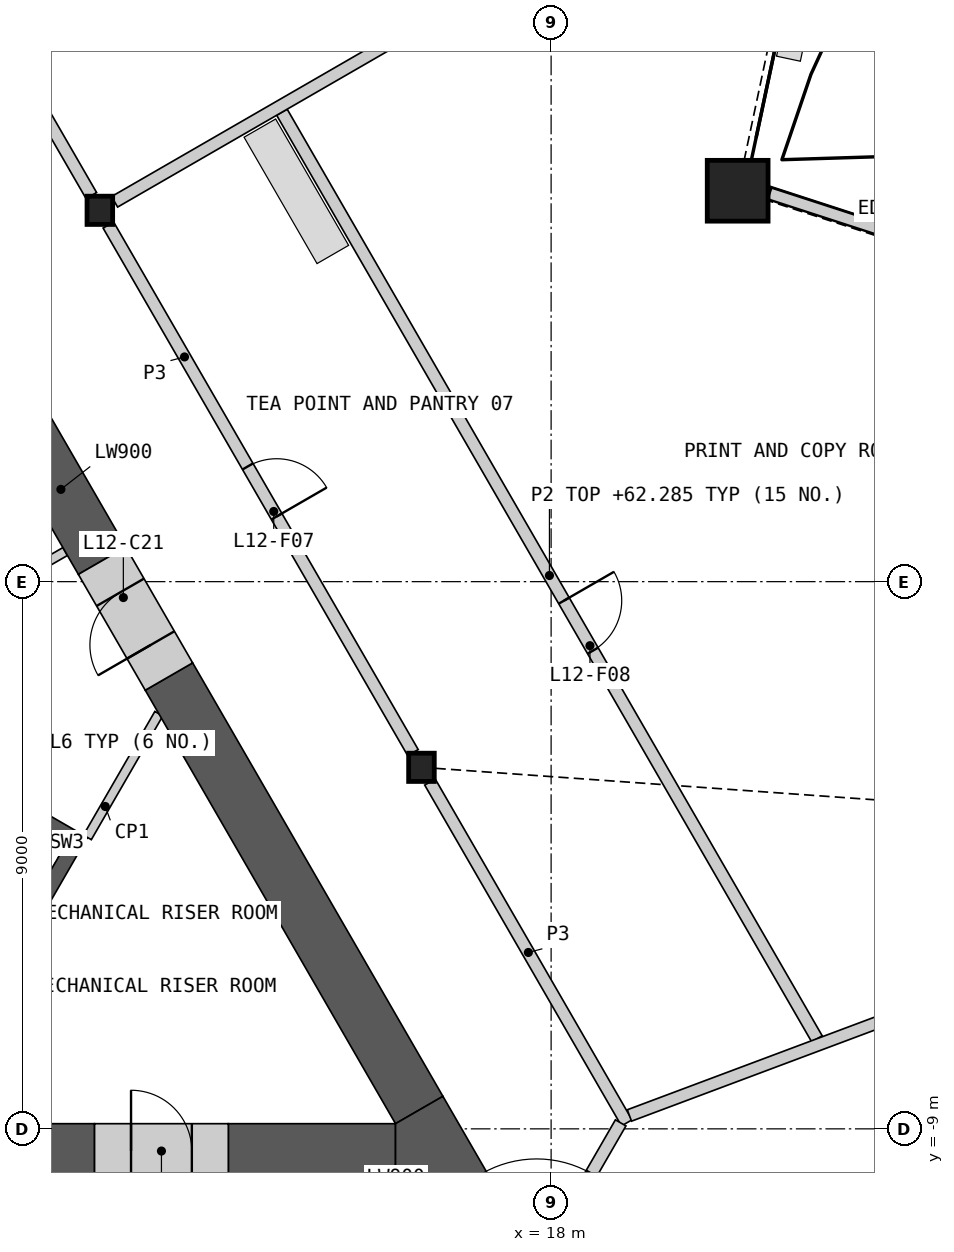
"""IFC4 building model, lengths in metres.
Left out: names, types, materials, properties, quantities, classifications, styles, units other than length and angle.
Written with IfcOpenShell. Run it as: python <this file> out.ifc"""

import sys

from ifc_helpers import new_model, si_unit, direction, frame, frame_2d, origin, origin_2d, place, context, subcontext, project, spatial, polyline, rectangle, hollow_rectangle, i_section, outline, extrude, element, fill, save


model = new_model("IFC4")
c1 = context("Model", 3, precision=1e-05, world=origin(), true_north=direction((0.0, 1.0)))
c2 = subcontext(c1, "Body", "Model", "MODEL_VIEW")
j1 = project(units=[si_unit("LENGTHUNIT", "METRE"), si_unit("PLANEANGLEUNIT", "RADIAN")], contexts=[c1])
p1 = place(None, origin())
s1 = spatial("IfcSite", under=j1, at=p1, CompositionType="ELEMENT")
p2 = place(p1, origin())
s2 = spatial("IfcBuilding", under=s1, at=p2, CompositionType="ELEMENT")
p3 = place(p2, frame((0.0, 0.0, 59.4)))
s3 = spatial("IfcBuildingStorey", under=s2, at=p3, CompositionType="ELEMENT", Elevation=59.4)
p4 = place(p3, frame((21.068, 6.429, 0.0), z_axis=(0.0, 0.0, 1.0), x_axis=(1.0, 0.0, 0.0)))
e1 = element("IfcColumn", 1, at=p4, inside=s3, PredefinedType="COLUMN", context=c2, shape_type="SweptSolid", body=[
    extrude(hollow_rectangle(XDim=1.0, YDim=1.0, WallThickness=0.07, at=origin_2d()), origin(), (0.0, 0.0, 1.0), 4.2),
])
for number, where, z_axis, x_axis in (
    (2, (15.868, -3.054, 0.0), (0.0, 0.0, 1.0), (1.0, 0.0, 0.0)),
    (3, (10.578, 6.107, 0.0), (0.0, 0.0, 1.0), (1.0, 0.0, 0.0)),
):
    element("IfcColumn", number, at=place(p3, frame(where, z_axis=z_axis, x_axis=x_axis)), inside=s3, PredefinedType="COLUMN", context=c2, shape_type="SweptSolid", body=[
        extrude(i_section(OverallWidth=0.421, OverallDepth=0.465, WebThickness=0.045, FlangeThickness=0.072, at=origin_2d()), origin(), (0.0, 0.0, 1.0), 4.2),
    ])
p5 = place(p3, frame((26.899, 4.661, 0.0), z_axis=(0.0, 0.0, 1.0), x_axis=(-0.951054004345, 0.309024725255, 0.0)))
e4 = element("IfcWall", 4, at=p5, inside=s3, PredefinedType="SOLIDWALL", context=c2, shape_type="SweptSolid", body=[
    extrude(rectangle(XDim=5.579, YDim=0.2, at=frame_2d((2.79, 0.0))), origin(), (0.0, 0.0, 1.0), 3.189),
])
p6 = place(p5, frame((1.91, 0.0, 0.0)))
e5 = element("IfcOpeningElement", 5, at=p6, cuts=e4, PredefinedType="OPENING", context=c2, shape_type="SweptSolid", body=[
    extrude(rectangle(XDim=1.6, YDim=2.4, at=frame_2d((0.8, 1.2))), frame((0.0, 0.11, 0.0), z_axis=(0.0, -1.0, 0.0), x_axis=(1.0, 0.0, 0.0)), (0.0, 0.0, 1.0), 0.22),
])
p7 = place(p3, origin())
e6 = element("IfcWall", 6, at=p7, inside=s3, PredefinedType="SHEAR", context=c2, shape_type="SweptSolid", body=[
    extrude(outline(polyline([(8.83, -6.881), (10.374, -4.206), (10.032, -4.298), (8.738, -6.539), (8.83, -6.881)])), origin(), (0.0, 0.0, 1.0), 3.8),
])
p8 = place(p3, origin())
e7 = element("IfcWall", 7, at=p8, inside=s3, PredefinedType="SHEAR", context=c2, shape_type="SweptSolid", body=[
    extrude(outline(polyline([(10.032, -4.298), (10.374, -4.206), (5.307, -1.281), (5.182, -1.498), (10.032, -4.298)])), origin(), (0.0, 0.0, 1.0), 3.8),
])
p9 = place(p3, frame((8.268, -0.509, 0.0), z_axis=(0.0, 0.0, 1.0), x_axis=(0.866035824272, 0.499981950752, 0.0)))
e8 = element("IfcWall", 8, at=p9, inside=s3, PredefinedType="PARTITIONING", context=c2, shape_type="SweptSolid", body=[
    extrude(rectangle(XDim=2.009, YDim=0.15, at=frame_2d((1.004, 0.0))), origin(), (0.0, 0.0, 1.0), 3.8),
])
p10 = place(p3, frame((10.374, -4.206, 0.0), z_axis=(0.0, 0.0, 1.0), x_axis=(0.499995339376, 0.86602809458, 0.0)))
e9 = element("IfcWall", 9, at=p10, inside=s3, PredefinedType="PARTITIONING", context=c2, shape_type="SweptSolid", body=[
    extrude(rectangle(XDim=2.349, YDim=0.15, at=frame_2d((1.175, 0.0))), origin(), (0.0, 0.0, 1.0), 3.8),
])
p11 = place(p3, frame((7.209, -9.365, 0.0), z_axis=(0.0, 0.0, 1.0), x_axis=(1.0, 0.0, 0.0)))
e10 = element("IfcWall", 10, at=p11, inside=s3, PredefinedType="SHEAR", context=c2, shape_type="SweptSolid", body=[
    extrude(rectangle(XDim=3.282, YDim=0.9, at=frame_2d((1.641, 0.0))), origin(), (0.0, 0.0, 1.0), 3.8),
])
p12 = place(p3, frame((12.691, -9.365, 0.0), z_axis=(0.0, 0.0, 1.0), x_axis=(1.0, 0.0, 0.0)))
e11 = element("IfcWall", 11, at=p12, inside=s3, PredefinedType="SHEAR", context=c2, shape_type="SweptSolid", body=[
    extrude(rectangle(XDim=2.75, YDim=0.9, at=frame_2d((1.375, 0.0))), origin(), (0.0, 0.0, 1.0), 3.8),
])
p13 = place(p3, frame((15.831, -8.69, 0.0), z_axis=(0.0, 0.0, 1.0), x_axis=(-0.499995435471, 0.8660280391, 0.0)))
e12 = element("IfcWall", 12, at=p13, inside=s3, PredefinedType="SHEAR", context=c2, shape_type="SweptSolid", body=[
    extrude(rectangle(XDim=8.232, YDim=0.9, at=frame_2d((4.116, 0.0))), origin(), (0.0, 0.0, 1.0), 3.8),
])
p14 = place(p3, frame((10.615, 0.344, 0.0), z_axis=(0.0, 0.0, 1.0), x_axis=(-0.500044870432, 0.865999496279, 0.0)))
e13 = element("IfcWall", 13, at=p14, inside=s3, PredefinedType="SHEAR", context=c2, shape_type="SweptSolid", body=[
    extrude(rectangle(XDim=2.709, YDim=0.9, at=frame_2d((1.354, 0.0))), origin(), (0.0, 0.0, 1.0), 3.8),
])
p15 = place(p3, origin())
e14 = element("IfcWall", 14, at=p15, inside=s3, PredefinedType="SHEAR", context=c2, shape_type="SweptSolid", body=[
    extrude(outline(polyline([(15.441, -9.815), (15.441, -8.915), (16.221, -8.465), (17.0, -9.815), (15.441, -9.815)])), origin(), (0.0, 0.0, 1.0), 3.8),
])
p16 = place(p3, frame((10.491, -9.365, 0.0), z_axis=(0.0, 0.0, 1.0), x_axis=(1.0, 0.0, 0.0)))
e15 = element("IfcWall", 15, at=p16, inside=s3, PredefinedType="SHEAR", context=c2, shape_type="SweptSolid", body=[
    extrude(rectangle(XDim=2.2, YDim=0.9, at=frame_2d((1.1, 0.0))), origin(), (0.0, 0.0, 1.0), 3.8),
])
p17 = place(p16, frame((0.6, 0.0, 0.0)))
e16 = element("IfcOpeningElement", 16, at=p17, cuts=e15, PredefinedType="OPENING", context=c2, shape_type="SweptSolid", body=[
    extrude(rectangle(XDim=1.0, YDim=2.1, at=frame_2d((0.5, 1.05))), frame((0.0, 0.46, 0.0), z_axis=(0.0, -1.0, 0.0), x_axis=(1.0, 0.0, 0.0)), (0.0, 0.0, 1.0), 0.92),
])
p18 = place(p3, frame((11.715, -1.561, 0.0), z_axis=(0.0, 0.0, 1.0), x_axis=(-0.499946605688, 0.86605622881, 0.0)))
e17 = element("IfcWall", 17, at=p18, inside=s3, PredefinedType="SHEAR", context=c2, shape_type="SweptSolid", body=[
    extrude(rectangle(XDim=2.2, YDim=0.9, at=frame_2d((1.1, 0.0))), origin(), (0.0, 0.0, 1.0), 3.8),
])
p19 = place(p18, frame((0.6, 0.0, 0.0)))
e18 = element("IfcOpeningElement", 18, at=p19, cuts=e17, PredefinedType="OPENING", context=c2, shape_type="SweptSolid", body=[
    extrude(rectangle(XDim=1.0, YDim=2.1, at=frame_2d((0.5, 1.05))), frame((0.0, 0.46, 0.0), z_axis=(0.0, -1.0, 0.0), x_axis=(1.0, 0.0, 0.0)), (0.0, 0.0, 1.0), 0.92),
])
p20 = place(p3, frame((5.429, 15.026, 0.0), z_axis=(0.0, 0.0, 1.0), x_axis=(0.50001002959, -0.86601961312, 0.0)))
e19 = element("IfcWall", 19, at=p20, inside=s3, PredefinedType="PARTITIONING", context=c2, shape_type="SweptSolid", body=[
    extrude(rectangle(XDim=10.019, YDim=0.2, at=frame_2d((5.009, 0.0))), origin(), (0.0, 0.0, 1.0), 3.8),
])
p21 = place(p20, frame((4.059, 0.0, 0.0)))
e20 = element("IfcOpeningElement", 20, at=p21, cuts=e19, PredefinedType="OPENING", context=c2, shape_type="SweptSolid", body=[
    extrude(rectangle(XDim=1.8, YDim=2.1, at=frame_2d((0.9, 1.05))), frame((0.0, 0.11, 0.0), z_axis=(0.0, -1.0, 0.0), x_axis=(1.0, 0.0, 0.0)), (0.0, 0.0, 1.0), 0.22),
])
p22 = place(p3, frame((10.719, 5.865, 0.0), z_axis=(0.0, 0.0, 1.0), x_axis=(0.49999175339, -0.866030164915, 0.0)))
e21 = element("IfcWall", 21, at=p22, inside=s3, PredefinedType="PARTITIONING", context=c2, shape_type="SweptSolid", body=[
    extrude(rectangle(XDim=10.019, YDim=0.2, at=frame_2d((5.009, 0.0))), origin(), (0.0, 0.0, 1.0), 3.8),
])
p23 = place(p22, frame((4.585, 0.0, 0.0)))
e22 = element("IfcOpeningElement", 22, at=p23, cuts=e21, PredefinedType="OPENING", context=c2, shape_type="SweptSolid", body=[
    extrude(rectangle(XDim=0.95, YDim=2.1, at=frame_2d((0.475, 1.05))), frame((0.0, 0.11, 0.0), z_axis=(0.0, -1.0, 0.0), x_axis=(1.0, 0.0, 0.0)), (0.0, 0.0, 1.0), 0.22),
])
p24 = place(p3, frame((16.008, -3.296, 0.0), z_axis=(0.0, 0.0, 1.0), x_axis=(0.499984737558, -0.86603421538, 0.0)))
e23 = element("IfcWall", 23, at=p24, inside=s3, PredefinedType="PARTITIONING", context=c2, shape_type="SweptSolid", body=[
    extrude(rectangle(XDim=6.473, YDim=0.2, at=frame_2d((3.236, 0.0))), origin(), (0.0, 0.0, 1.0), 3.8),
])
p25 = place(p3, frame((17.281, -12.128, 0.0), z_axis=(0.0, 0.0, 1.0), x_axis=(0.499958791762, 0.866049194065, 0.0)))
e24 = element("IfcWall", 24, at=p25, inside=s3, PredefinedType="PARTITIONING", context=c2, shape_type="SweptSolid", body=[
    extrude(rectangle(XDim=3.726, YDim=0.2, at=frame_2d((1.863, 0.0))), origin(), (0.0, 0.0, 1.0), 3.8),
])
p26 = place(p25, frame((0.963, 0.0, 0.0)))
e25 = element("IfcOpeningElement", 25, at=p26, cuts=e24, PredefinedType="OPENING", context=c2, shape_type="SweptSolid", body=[
    extrude(rectangle(XDim=1.8, YDim=2.1, at=frame_2d((0.9, 1.05))), frame((0.0, 0.11, 0.0), z_axis=(0.0, -1.0, 0.0), x_axis=(1.0, 0.0, 0.0)), (0.0, 0.0, 1.0), 0.22),
])
p27 = place(p3, frame((13.573, 7.721, 0.0), z_axis=(0.0, 0.0, 1.0), x_axis=(0.499990262232, -0.866031025814, 0.0)))
e26 = element("IfcWall", 26, at=p27, inside=s3, PredefinedType="PARTITIONING", context=c2, shape_type="SweptSolid", body=[
    extrude(rectangle(XDim=17.597, YDim=0.2, at=frame_2d((8.799, 0.0))), origin(), (0.0, 0.0, 1.0), 2.885),
])
p28 = place(p27, frame((9.277, 0.0, 0.0)))
e27 = element("IfcOpeningElement", 27, at=p28, cuts=e26, PredefinedType="OPENING", context=c2, shape_type="SweptSolid", body=[
    extrude(rectangle(XDim=0.95, YDim=2.1, at=frame_2d((0.475, 1.05))), frame((0.0, 0.11, 0.0), z_axis=(0.0, -1.0, 0.0), x_axis=(1.0, 0.0, 0.0)), (0.0, 0.0, 1.0), 0.22),
])
p29 = place(p3, frame((19.288, -8.78, 0.0), z_axis=(0.0, 0.0, 1.0), x_axis=(0.93644254502, 0.350820979814, 0.0)))
e28 = element("IfcWall", 28, at=p29, inside=s3, PredefinedType="PARTITIONING", context=c2, shape_type="SweptSolid", body=[
    extrude(rectangle(XDim=13.447, YDim=0.2, at=frame_2d((6.723, 0.0))), origin(), (0.0, 0.0, 1.0), 2.885),
])
p30 = place(p3, frame((10.821, 6.247, 0.0), z_axis=(0.0, 0.0, 1.0), x_axis=(0.866026729935, 0.499997703033, 0.0)))
e29 = element("IfcWall", 29, at=p30, inside=s3, PredefinedType="PARTITIONING", context=c2, shape_type="SweptSolid", body=[
    extrude(rectangle(XDim=12.848, YDim=0.2, at=frame_2d((6.424, 0.0))), origin(), (0.0, 0.0, 1.0), 2.885),
])
p31 = place(p17, origin())
e30 = element("IfcDoor", 30, at=p31, inside=s3, OperationType="SINGLE_SWING_LEFT", PredefinedType="DOOR", context=c2, shape_type="SweptSolid", body=[
    extrude(rectangle(XDim=1.0, YDim=2.1, at=frame_2d((0.5, 1.05))), frame((0.0, 0.205, 0.0), z_axis=(0.0, -1.0, 0.0), x_axis=(1.0, 0.0, 0.0)), (0.0, 0.0, 1.0), 0.05),
])
fill(e16, e30)
p32 = place(p19, origin())
e31 = element("IfcDoor", 31, at=p32, inside=s3, OperationType="SINGLE_SWING_LEFT", PredefinedType="DOOR", context=c2, shape_type="SweptSolid", body=[
    extrude(rectangle(XDim=1.0, YDim=2.1, at=frame_2d((0.5, 1.05))), frame((0.0, 0.205, 0.0), z_axis=(0.0, -1.0, 0.0), x_axis=(1.0, 0.0, 0.0)), (0.0, 0.0, 1.0), 0.05),
])
fill(e18, e31)
p33 = place(p23, origin())
e32 = element("IfcDoor", 32, at=p33, inside=s3, OperationType="SINGLE_SWING_RIGHT", PredefinedType="DOOR", context=c2, shape_type="SweptSolid", body=[
    extrude(rectangle(XDim=0.95, YDim=2.1, at=frame_2d((0.475, 1.05))), frame((0.0, 0.025, 0.0), z_axis=(0.0, -1.0, 0.0), x_axis=(1.0, 0.0, 0.0)), (0.0, 0.0, 1.0), 0.05),
])
fill(e22, e32)
p34 = place(p28, origin())
e33 = element("IfcDoor", 33, at=p34, inside=s3, OperationType="SINGLE_SWING_LEFT", PredefinedType="DOOR", context=c2, shape_type="SweptSolid", body=[
    extrude(rectangle(XDim=0.95, YDim=2.1, at=frame_2d((0.475, 1.05))), frame((0.0, 0.025, 0.0), z_axis=(0.0, -1.0, 0.0), x_axis=(1.0, 0.0, 0.0)), (0.0, 0.0, 1.0), 0.05),
])
fill(e27, e33)
save(model, sys.argv[1])
